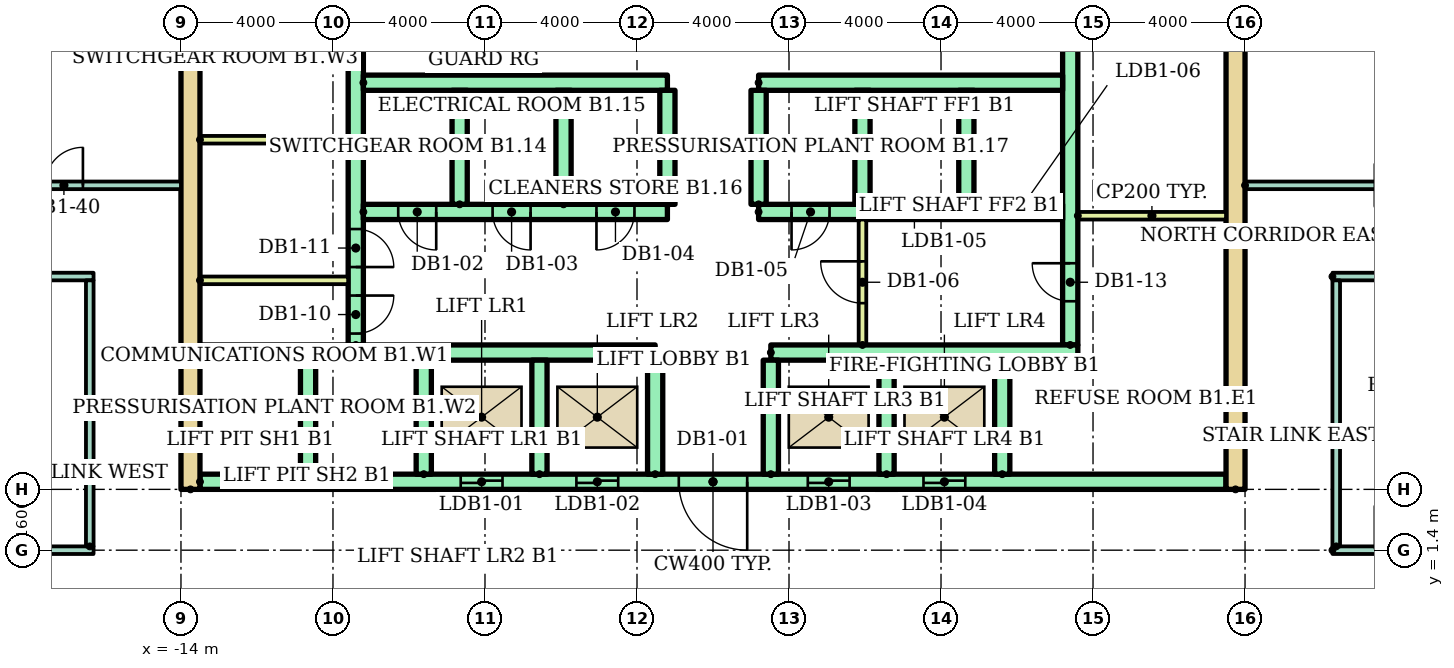
"""IFC4 building model, lengths in metres.
Left out: names, types, materials, properties, quantities, classifications, styles, units other than length and angle.
Written with IfcOpenShell. Run it as: python <this file> out.ifc"""

import sys

from ifc_helpers import new_model, si_unit, direction, frame, frame_2d, origin, place, context, subcontext, project, spatial, rectangle, extrude, element, fill, save


model = new_model("IFC4")
c1 = context("Model", 3, precision=1e-05, world=origin(), true_north=direction((0.0, 1.0)))
c2 = subcontext(c1, "Body", "Model", "MODEL_VIEW")
j1 = project(units=[si_unit("LENGTHUNIT", "METRE"), si_unit("PLANEANGLEUNIT", "RADIAN")], contexts=[c1])
p1 = place(None, origin())
s1 = spatial("IfcSite", under=j1, at=p1, CompositionType="ELEMENT")
p2 = place(p1, origin())
s2 = spatial("IfcBuilding", under=s1, at=p2, CompositionType="ELEMENT")
p3 = place(p2, frame((0.0, 0.0, -5.0)))
s3 = spatial("IfcBuildingStorey", under=s2, at=p3, CompositionType="ELEMENT", Elevation=-5.0)
for number, where, z_axis, x_axis in (
    (1, (-13.75, 3.0, 0.0), (0.0, 0.0, 1.0), (0.0, 1.0, 0.0)),
    (2, (13.75, 3.0, 0.0), (0.0, 0.0, 1.0), (0.0, 1.0, 0.0)),
):
    element("IfcWall", number, at=place(p3, frame(where, z_axis=z_axis, x_axis=x_axis)), inside=s3, PredefinedType="SHEAR", context=c2, shape_type="SweptSolid", body=[
        extrude(rectangle(XDim=17.4, YDim=0.5, at=frame_2d((8.7, 0.0))), origin(), (0.0, 0.0, 1.0), 4.58),
    ])
p4 = place(p3, frame((-9.4, 6.8, 0.0), z_axis=(0.0, 0.0, 1.0), x_axis=(0.0, 1.0, 0.0)))
e3 = element("IfcWall", 3, at=p4, inside=s3, PredefinedType="SHEAR", context=c2, shape_type="SweptSolid", body=[
    extrude(rectangle(XDim=12.7, YDim=0.4, at=frame_2d((6.35, 0.0))), origin(), (0.0, 0.0, 1.0), 4.58),
])
p5 = place(p4, frame((0.3, 0.0, 0.0)))
e4 = element("IfcOpeningElement", 4, at=p5, cuts=e3, PredefinedType="OPENING", context=c2, shape_type="SweptSolid", body=[
    extrude(rectangle(XDim=1.0, YDim=2.1, at=frame_2d((0.5, 1.05))), frame((0.0, 0.21, 0.0), z_axis=(0.0, -1.0, 0.0), x_axis=(1.0, 0.0, 0.0)), (0.0, 0.0, 1.0), 0.42),
])
p6 = place(p4, frame((2.05, 0.0, 0.0)))
e5 = element("IfcOpeningElement", 5, at=p6, cuts=e3, PredefinedType="OPENING", context=c2, shape_type="SweptSolid", body=[
    extrude(rectangle(XDim=1.0, YDim=2.1, at=frame_2d((0.5, 1.05))), frame((0.0, 0.21, 0.0), z_axis=(0.0, -1.0, 0.0), x_axis=(1.0, 0.0, 0.0)), (0.0, 0.0, 1.0), 0.42),
])
p7 = place(p4, frame((7.925, 0.0, 0.0)))
e6 = element("IfcOpeningElement", 6, at=p7, cuts=e3, PredefinedType="OPENING", context=c2, shape_type="SweptSolid", body=[
    extrude(rectangle(XDim=1.0, YDim=2.1, at=frame_2d((0.5, 1.05))), frame((0.0, 0.21, 0.0), z_axis=(0.0, -1.0, 0.0), x_axis=(1.0, 0.0, 0.0)), (0.0, 0.0, 1.0), 0.42),
])
p8 = place(p3, frame((9.4, 6.8, 0.0), z_axis=(0.0, 0.0, 1.0), x_axis=(0.0, 1.0, 0.0)))
e7 = element("IfcWall", 7, at=p8, inside=s3, PredefinedType="SHEAR", context=c2, shape_type="SweptSolid", body=[
    extrude(rectangle(XDim=12.7, YDim=0.4, at=frame_2d((6.35, 0.0))), origin(), (0.0, 0.0, 1.0), 4.58),
])
p9 = place(p8, frame((1.15, 0.0, 0.0)))
e8 = element("IfcOpeningElement", 8, at=p9, cuts=e7, PredefinedType="OPENING", context=c2, shape_type="SweptSolid", body=[
    extrude(rectangle(XDim=1.0, YDim=2.1, at=frame_2d((0.5, 1.05))), frame((0.0, 0.21, 0.0), z_axis=(0.0, -1.0, 0.0), x_axis=(1.0, 0.0, 0.0)), (0.0, 0.0, 1.0), 0.42),
])
p10 = place(p8, frame((7.925, 0.0, 0.0)))
e9 = element("IfcOpeningElement", 9, at=p10, cuts=e7, PredefinedType="OPENING", context=c2, shape_type="SweptSolid", body=[
    extrude(rectangle(XDim=1.0, YDim=2.1, at=frame_2d((0.5, 1.05))), frame((0.0, 0.21, 0.0), z_axis=(0.0, -1.0, 0.0), x_axis=(1.0, 0.0, 0.0)), (0.0, 0.0, 1.0), 0.42),
])
p11 = place(p3, frame((-13.5, 3.2, 0.0)))
e10 = element("IfcWall", 10, at=p11, inside=s3, PredefinedType="SHEAR", context=c2, shape_type="SweptSolid", body=[
    extrude(rectangle(XDim=27.0, YDim=0.4, at=frame_2d((13.5, 0.0))), origin(), (0.0, 0.0, 1.0), 4.58),
])
p12 = place(p11, frame((6.861, 0.0, 0.0)))
e11 = element("IfcOpeningElement", 11, at=p12, cuts=e10, PredefinedType="OPENING", context=c2, shape_type="SweptSolid", body=[
    extrude(rectangle(XDim=1.1, YDim=2.1, at=frame_2d((0.55, 1.05))), frame((0.0, 0.21, 0.0), z_axis=(0.0, -1.0, 0.0), x_axis=(1.0, 0.0, 0.0)), (0.0, 0.0, 1.0), 0.42),
])
p13 = place(p11, frame((9.906, 0.0, 0.0)))
e12 = element("IfcOpeningElement", 12, at=p13, cuts=e10, PredefinedType="OPENING", context=c2, shape_type="SweptSolid", body=[
    extrude(rectangle(XDim=1.1, YDim=2.1, at=frame_2d((0.55, 1.05))), frame((0.0, 0.21, 0.0), z_axis=(0.0, -1.0, 0.0), x_axis=(1.0, 0.0, 0.0)), (0.0, 0.0, 1.0), 0.42),
])
p14 = place(p11, frame((15.994, 0.0, 0.0)))
e13 = element("IfcOpeningElement", 13, at=p14, cuts=e10, PredefinedType="OPENING", context=c2, shape_type="SweptSolid", body=[
    extrude(rectangle(XDim=1.1, YDim=2.1, at=frame_2d((0.55, 1.05))), frame((0.0, 0.21, 0.0), z_axis=(0.0, -1.0, 0.0), x_axis=(1.0, 0.0, 0.0)), (0.0, 0.0, 1.0), 0.42),
])
p15 = place(p11, frame((19.039, 0.0, 0.0)))
e14 = element("IfcOpeningElement", 14, at=p15, cuts=e10, PredefinedType="OPENING", context=c2, shape_type="SweptSolid", body=[
    extrude(rectangle(XDim=1.1, YDim=2.1, at=frame_2d((0.55, 1.05))), frame((0.0, 0.21, 0.0), z_axis=(0.0, -1.0, 0.0), x_axis=(1.0, 0.0, 0.0)), (0.0, 0.0, 1.0), 0.42),
])
p16 = place(p11, frame((12.6, 0.0, 0.0)))
e15 = element("IfcOpeningElement", 15, at=p16, cuts=e10, PredefinedType="OPENING", context=c2, shape_type="SweptSolid", body=[
    extrude(rectangle(XDim=1.8, YDim=2.1, at=frame_2d((0.9, 1.05))), frame((0.0, 0.21, 0.0), z_axis=(0.0, -1.0, 0.0), x_axis=(1.0, 0.0, 0.0)), (0.0, 0.0, 1.0), 0.42),
])
p17 = place(p3, frame((-13.5, 6.6, 0.0)))
e16 = element("IfcWall", 16, at=p17, inside=s3, PredefinedType="SHEAR", context=c2, shape_type="SweptSolid", body=[
    extrude(rectangle(XDim=11.978, YDim=0.4, at=frame_2d((5.989, 0.0))), origin(), (0.0, 0.0, 1.0), 4.58),
])
p18 = place(p3, frame((1.522, 6.6, 0.0)))
e17 = element("IfcWall", 17, at=p18, inside=s3, PredefinedType="SHEAR", context=c2, shape_type="SweptSolid", body=[
    extrude(rectangle(XDim=8.078, YDim=0.4, at=frame_2d((4.039, 0.0))), origin(), (0.0, 0.0, 1.0), 4.58),
])
for number, where, z_axis, x_axis in (
    (18, (-10.656, 3.4, 0.0), (0.0, 0.0, 1.0), (0.0, 1.0, 0.0)),
    (19, (-7.611, 3.4, 0.0), (0.0, 0.0, 1.0), (0.0, 1.0, 0.0)),
    (20, (-4.567, 3.4, 0.0), (0.0, 0.0, 1.0), (0.0, 1.0, 0.0)),
    (21, (-1.522, 3.4, 0.0), (0.0, 0.0, 1.0), (0.0, 1.0, 0.0)),
    (22, (1.522, 3.4, 0.0), (0.0, 0.0, 1.0), (0.0, 1.0, 0.0)),
    (23, (4.567, 3.4, 0.0), (0.0, 0.0, 1.0), (0.0, 1.0, 0.0)),
    (24, (7.611, 3.4, 0.0), (0.0, 0.0, 1.0), (0.0, 1.0, 0.0)),
):
    element("IfcWall", number, at=place(p3, frame(where, z_axis=z_axis, x_axis=x_axis)), inside=s3, PredefinedType="SHEAR", context=c2, shape_type="SweptSolid", body=[
        extrude(rectangle(XDim=3.0, YDim=0.4, at=frame_2d((1.5, 0.0))), origin(), (0.0, 0.0, 1.0), 4.58),
    ])
p19 = place(p3, frame((-9.2, 10.3, 0.0)))
e25 = element("IfcWall", 25, at=p19, inside=s3, PredefinedType="SHEAR", context=c2, shape_type="SweptSolid", body=[
    extrude(rectangle(XDim=8.0, YDim=0.4, at=frame_2d((4.0, 0.0))), origin(), (0.0, 0.0, 1.0), 4.58),
])
p20 = place(p19, frame((0.917, 0.0, 0.0)))
e26 = element("IfcOpeningElement", 26, at=p20, cuts=e25, PredefinedType="OPENING", context=c2, shape_type="SweptSolid", body=[
    extrude(rectangle(XDim=1.0, YDim=2.1, at=frame_2d((0.5, 1.05))), frame((0.0, 0.21, 0.0), z_axis=(0.0, -1.0, 0.0), x_axis=(1.0, 0.0, 0.0)), (0.0, 0.0, 1.0), 0.42),
])
p21 = place(p19, frame((3.4, 0.0, 0.0)))
e27 = element("IfcOpeningElement", 27, at=p21, cuts=e25, PredefinedType="OPENING", context=c2, shape_type="SweptSolid", body=[
    extrude(rectangle(XDim=1.0, YDim=2.1, at=frame_2d((0.5, 1.05))), frame((0.0, 0.21, 0.0), z_axis=(0.0, -1.0, 0.0), x_axis=(1.0, 0.0, 0.0)), (0.0, 0.0, 1.0), 0.42),
])
p22 = place(p19, frame((6.133, 0.0, 0.0)))
e28 = element("IfcOpeningElement", 28, at=p22, cuts=e25, PredefinedType="OPENING", context=c2, shape_type="SweptSolid", body=[
    extrude(rectangle(XDim=1.0, YDim=2.1, at=frame_2d((0.5, 1.05))), frame((0.0, 0.21, 0.0), z_axis=(0.0, -1.0, 0.0), x_axis=(1.0, 0.0, 0.0)), (0.0, 0.0, 1.0), 0.42),
])
p23 = place(p3, frame((-9.2, 13.7, 0.0)))
e29 = element("IfcWall", 29, at=p23, inside=s3, PredefinedType="SHEAR", context=c2, shape_type="SweptSolid", body=[
    extrude(rectangle(XDim=8.0, YDim=0.4, at=frame_2d((4.0, 0.0))), origin(), (0.0, 0.0, 1.0), 4.58),
])
p24 = place(p3, frame((1.2, 10.3, 0.0)))
e30 = element("IfcWall", 30, at=p24, inside=s3, PredefinedType="SHEAR", context=c2, shape_type="SweptSolid", body=[
    extrude(rectangle(XDim=8.0, YDim=0.4, at=frame_2d((4.0, 0.0))), origin(), (0.0, 0.0, 1.0), 4.58),
])
p25 = place(p24, frame((3.55, 0.0, 0.0)))
e31 = element("IfcOpeningElement", 31, at=p25, cuts=e30, PredefinedType="OPENING", context=c2, shape_type="SweptSolid", body=[
    extrude(rectangle(XDim=1.1, YDim=2.1, at=frame_2d((0.55, 1.05))), frame((0.0, 0.21, 0.0), z_axis=(0.0, -1.0, 0.0), x_axis=(1.0, 0.0, 0.0)), (0.0, 0.0, 1.0), 0.42),
])
p26 = place(p24, frame((6.283, 0.0, 0.0)))
e32 = element("IfcOpeningElement", 32, at=p26, cuts=e30, PredefinedType="OPENING", context=c2, shape_type="SweptSolid", body=[
    extrude(rectangle(XDim=1.1, YDim=2.1, at=frame_2d((0.55, 1.05))), frame((0.0, 0.21, 0.0), z_axis=(0.0, -1.0, 0.0), x_axis=(1.0, 0.0, 0.0)), (0.0, 0.0, 1.0), 0.42),
])
p27 = place(p24, frame((0.867, 0.0, 0.0)))
e33 = element("IfcOpeningElement", 33, at=p27, cuts=e30, PredefinedType="OPENING", context=c2, shape_type="SweptSolid", body=[
    extrude(rectangle(XDim=1.0, YDim=2.1, at=frame_2d((0.5, 1.05))), frame((0.0, 0.21, 0.0), z_axis=(0.0, -1.0, 0.0), x_axis=(1.0, 0.0, 0.0)), (0.0, 0.0, 1.0), 0.42),
])
p28 = place(p3, frame((1.2, 13.7, 0.0)))
e34 = element("IfcWall", 34, at=p28, inside=s3, PredefinedType="SHEAR", context=c2, shape_type="SweptSolid", body=[
    extrude(rectangle(XDim=8.0, YDim=0.4, at=frame_2d((4.0, 0.0))), origin(), (0.0, 0.0, 1.0), 4.58),
])
for number, where, z_axis, x_axis in (
    (35, (-6.667, 10.5, 0.0), (0.0, 0.0, 1.0), (0.0, 1.0, 0.0)),
    (36, (-3.933, 10.5, 0.0), (0.0, 0.0, 1.0), (0.0, 1.0, 0.0)),
    (37, (-1.2, 10.5, 0.0), (0.0, 0.0, 1.0), (0.0, 1.0, 0.0)),
    (38, (1.2, 10.5, 0.0), (0.0, 0.0, 1.0), (0.0, 1.0, 0.0)),
    (39, (3.933, 10.5, 0.0), (0.0, 0.0, 1.0), (0.0, 1.0, 0.0)),
    (40, (6.667, 10.5, 0.0), (0.0, 0.0, 1.0), (0.0, 1.0, 0.0)),
):
    element("IfcWall", number, at=place(p3, frame(where, z_axis=z_axis, x_axis=x_axis)), inside=s3, PredefinedType="SHEAR", context=c2, shape_type="SweptSolid", body=[
        extrude(rectangle(XDim=3.0, YDim=0.4, at=frame_2d((1.5, 0.0))), origin(), (0.0, 0.0, 1.0), 4.58),
    ])
p29 = place(p3, frame((3.933, 6.8, 0.0), z_axis=(0.0, 0.0, 1.0), x_axis=(0.0, 1.0, 0.0)))
e41 = element("IfcWall", 41, at=p29, inside=s3, PredefinedType="PARTITIONING", context=c2, shape_type="SweptSolid", body=[
    extrude(rectangle(XDim=3.3, YDim=0.2, at=frame_2d((1.65, 0.0))), origin(), (0.0, 0.0, 1.0), 4.58),
])
p30 = place(p29, frame((1.1, 0.0, 0.0)))
e42 = element("IfcOpeningElement", 42, at=p30, cuts=e41, PredefinedType="OPENING", context=c2, shape_type="SweptSolid", body=[
    extrude(rectangle(XDim=1.1, YDim=2.1, at=frame_2d((0.55, 1.05))), frame((0.0, 0.11, 0.0), z_axis=(0.0, -1.0, 0.0), x_axis=(1.0, 0.0, 0.0)), (0.0, 0.0, 1.0), 0.22),
])
for number, where in (
    (43, (-13.5, 8.5, 0.0)),
    (44, (-13.5, 12.2, 0.0)),
    (45, (9.6, 10.2, 0.0)),
):
    element("IfcWall", number, at=place(p3, frame(where)), inside=s3, PredefinedType="PARTITIONING", context=c2, shape_type="SweptSolid", body=[
        extrude(rectangle(XDim=3.9, YDim=0.2, at=frame_2d((1.95, 0.0))), origin(), (0.0, 0.0, 1.0), 4.58),
    ])
p31 = place(p3, frame((-21.45, 1.4, 0.0)))
e46 = element("IfcWall", 46, at=p31, inside=s3, PredefinedType="PARTITIONING", context=c2, shape_type="SweptSolid", body=[
    extrude(rectangle(XDim=5.15, YDim=0.2, at=frame_2d((2.575, 0.0))), origin(), (0.0, 0.0, 1.0), 4.58),
])
p32 = place(p3, frame((16.3, 1.4, 0.0)))
e47 = element("IfcWall", 47, at=p32, inside=s3, PredefinedType="PARTITIONING", context=c2, shape_type="SweptSolid", body=[
    extrude(rectangle(XDim=1.15, YDim=0.2, at=frame_2d((0.575, 0.0))), origin(), (0.0, 0.0, 1.0), 4.58),
])
p33 = place(p3, frame((-37.6, 8.6, 0.0)))
e48 = element("IfcWall", 48, at=p33, inside=s3, PredefinedType="PARTITIONING", context=c2, shape_type="SweptSolid", body=[
    extrude(rectangle(XDim=21.3, YDim=0.2, at=frame_2d((10.65, 0.0))), origin(), (0.0, 0.0, 1.0), 4.58),
])
p34 = place(p33, frame((3.5, 0.0, 0.0)))
e49 = element("IfcOpeningElement", 49, at=p34, cuts=e48, PredefinedType="OPENING", context=c2, shape_type="SweptSolid", body=[
    extrude(rectangle(XDim=1.0, YDim=2.1, at=frame_2d((0.5, 1.05))), frame((0.0, 0.11, 0.0), z_axis=(0.0, -1.0, 0.0), x_axis=(1.0, 0.0, 0.0)), (0.0, 0.0, 1.0), 0.22),
])
p35 = place(p3, frame((16.3, 8.6, 0.0)))
e50 = element("IfcWall", 50, at=p35, inside=s3, PredefinedType="PARTITIONING", context=c2, shape_type="SweptSolid", body=[
    extrude(rectangle(XDim=21.3, YDim=0.2, at=frame_2d((10.65, 0.0))), origin(), (0.0, 0.0, 1.0), 4.58),
])
p36 = place(p35, frame((3.6, 0.0, 0.0)))
e51 = element("IfcOpeningElement", 51, at=p36, cuts=e50, PredefinedType="OPENING", context=c2, shape_type="SweptSolid", body=[
    extrude(rectangle(XDim=1.0, YDim=2.1, at=frame_2d((0.5, 1.05))), frame((0.0, 0.11, 0.0), z_axis=(0.0, -1.0, 0.0), x_axis=(1.0, 0.0, 0.0)), (0.0, 0.0, 1.0), 0.22),
])
p37 = place(p3, frame((-21.45, 11.0, 0.0)))
e52 = element("IfcWall", 52, at=p37, inside=s3, PredefinedType="PARTITIONING", context=c2, shape_type="SweptSolid", body=[
    extrude(rectangle(XDim=7.45, YDim=0.2, at=frame_2d((3.725, 0.0))), origin(), (0.0, 0.0, 1.0), 4.58),
])
p38 = place(p37, frame((0.35, 0.0, 0.0)))
e53 = element("IfcOpeningElement", 53, at=p38, cuts=e52, PredefinedType="OPENING", context=c2, shape_type="SweptSolid", body=[
    extrude(rectangle(XDim=1.0, YDim=2.1, at=frame_2d((0.5, 1.05))), frame((0.0, 0.11, 0.0), z_axis=(0.0, -1.0, 0.0), x_axis=(1.0, 0.0, 0.0)), (0.0, 0.0, 1.0), 0.22),
])
p39 = place(p37, frame((3.87, 0.0, 0.0)))
e54 = element("IfcOpeningElement", 54, at=p39, cuts=e52, PredefinedType="OPENING", context=c2, shape_type="SweptSolid", body=[
    extrude(rectangle(XDim=1.0, YDim=2.1, at=frame_2d((0.5, 1.05))), frame((0.0, 0.11, 0.0), z_axis=(0.0, -1.0, 0.0), x_axis=(1.0, 0.0, 0.0)), (0.0, 0.0, 1.0), 0.22),
])
p40 = place(p3, frame((14.0, 11.0, 0.0)))
e55 = element("IfcWall", 55, at=p40, inside=s3, PredefinedType="PARTITIONING", context=c2, shape_type="SweptSolid", body=[
    extrude(rectangle(XDim=3.45, YDim=0.2, at=frame_2d((1.725, 0.0))), origin(), (0.0, 0.0, 1.0), 4.58),
])
for number, where, z_axis, x_axis in (
    (56, (-16.4, 1.5, 0.0), (0.0, 0.0, 1.0), (0.0, 1.0, 0.0)),
    (57, (16.4, 1.5, 0.0), (0.0, 0.0, 1.0), (0.0, 1.0, 0.0)),
):
    element("IfcWall", number, at=place(p3, frame(where, z_axis=z_axis, x_axis=x_axis)), inside=s3, PredefinedType="PARTITIONING", context=c2, shape_type="SweptSolid", body=[
        extrude(rectangle(XDim=7.0, YDim=0.2, at=frame_2d((3.5, 0.0))), origin(), (0.0, 0.0, 1.0), 4.58),
    ])
p41 = place(p12, origin())
e58 = element("IfcDoor", 58, at=p41, inside=s3, OperationType="SLIDING_TO_LEFT", PredefinedType="DOOR", context=c2, shape_type="SweptSolid", body=[
    extrude(rectangle(XDim=1.1, YDim=2.1, at=frame_2d((0.55, 1.05))), frame((0.0, 0.025, 0.0), z_axis=(0.0, -1.0, 0.0), x_axis=(1.0, 0.0, 0.0)), (0.0, 0.0, 1.0), 0.05),
])
fill(e11, e58)
p42 = place(p13, origin())
e59 = element("IfcDoor", 59, at=p42, inside=s3, OperationType="SLIDING_TO_LEFT", PredefinedType="DOOR", context=c2, shape_type="SweptSolid", body=[
    extrude(rectangle(XDim=1.1, YDim=2.1, at=frame_2d((0.55, 1.05))), frame((0.0, 0.025, 0.0), z_axis=(0.0, -1.0, 0.0), x_axis=(1.0, 0.0, 0.0)), (0.0, 0.0, 1.0), 0.05),
])
fill(e12, e59)
p43 = place(p14, origin())
e60 = element("IfcDoor", 60, at=p43, inside=s3, OperationType="SLIDING_TO_LEFT", PredefinedType="DOOR", context=c2, shape_type="SweptSolid", body=[
    extrude(rectangle(XDim=1.1, YDim=2.1, at=frame_2d((0.55, 1.05))), frame((0.0, 0.025, 0.0), z_axis=(0.0, -1.0, 0.0), x_axis=(1.0, 0.0, 0.0)), (0.0, 0.0, 1.0), 0.05),
])
fill(e13, e60)
p44 = place(p15, origin())
e61 = element("IfcDoor", 61, at=p44, inside=s3, OperationType="SLIDING_TO_LEFT", PredefinedType="DOOR", context=c2, shape_type="SweptSolid", body=[
    extrude(rectangle(XDim=1.1, YDim=2.1, at=frame_2d((0.55, 1.05))), frame((0.0, 0.025, 0.0), z_axis=(0.0, -1.0, 0.0), x_axis=(1.0, 0.0, 0.0)), (0.0, 0.0, 1.0), 0.05),
])
fill(e14, e61)
p45 = place(p16, frame((1.8, 0.0, 0.0), z_axis=(0.0, 0.0, 1.0), x_axis=(-1.0, 0.0, 0.0)))
e62 = element("IfcDoor", 62, at=p45, inside=s3, OperationType="DOUBLE_DOOR_SINGLE_SWING", PredefinedType="DOOR", context=c2, shape_type="SweptSolid", body=[
    extrude(rectangle(XDim=1.8, YDim=2.1, at=frame_2d((0.9, 1.05))), frame((0.0, 0.025, 0.0), z_axis=(0.0, -1.0, 0.0), x_axis=(1.0, 0.0, 0.0)), (0.0, 0.0, 1.0), 0.05),
])
fill(e15, e62)
p46 = place(p25, origin())
e63 = element("IfcDoor", 63, at=p46, inside=s3, OperationType="SLIDING_TO_LEFT", PredefinedType="DOOR", context=c2, shape_type="SweptSolid", body=[
    extrude(rectangle(XDim=1.1, YDim=2.1, at=frame_2d((0.55, 1.05))), frame((0.0, 0.025, 0.0), z_axis=(0.0, -1.0, 0.0), x_axis=(1.0, 0.0, 0.0)), (0.0, 0.0, 1.0), 0.05),
])
fill(e31, e63)
p47 = place(p26, origin())
e64 = element("IfcDoor", 64, at=p47, inside=s3, OperationType="SLIDING_TO_LEFT", PredefinedType="DOOR", context=c2, shape_type="SweptSolid", body=[
    extrude(rectangle(XDim=1.1, YDim=2.1, at=frame_2d((0.55, 1.05))), frame((0.0, 0.025, 0.0), z_axis=(0.0, -1.0, 0.0), x_axis=(1.0, 0.0, 0.0)), (0.0, 0.0, 1.0), 0.05),
])
fill(e32, e64)
p48 = place(p20, frame((1.0, 0.0, 0.0), z_axis=(0.0, 0.0, 1.0), x_axis=(-1.0, 0.0, 0.0)))
e65 = element("IfcDoor", 65, at=p48, inside=s3, OperationType="SINGLE_SWING_RIGHT", PredefinedType="DOOR", context=c2, shape_type="SweptSolid", body=[
    extrude(rectangle(XDim=1.0, YDim=2.1, at=frame_2d((0.5, 1.05))), frame((0.0, 0.025, 0.0), z_axis=(0.0, -1.0, 0.0), x_axis=(1.0, 0.0, 0.0)), (0.0, 0.0, 1.0), 0.05),
])
fill(e26, e65)
p49 = place(p21, frame((1.0, 0.0, 0.0), z_axis=(0.0, 0.0, 1.0), x_axis=(-1.0, 0.0, 0.0)))
e66 = element("IfcDoor", 66, at=p49, inside=s3, OperationType="SINGLE_SWING_RIGHT", PredefinedType="DOOR", context=c2, shape_type="SweptSolid", body=[
    extrude(rectangle(XDim=1.0, YDim=2.1, at=frame_2d((0.5, 1.05))), frame((0.0, 0.025, 0.0), z_axis=(0.0, -1.0, 0.0), x_axis=(1.0, 0.0, 0.0)), (0.0, 0.0, 1.0), 0.05),
])
fill(e27, e66)
p50 = place(p22, frame((1.0, 0.0, 0.0), z_axis=(0.0, 0.0, 1.0), x_axis=(-1.0, 0.0, 0.0)))
e67 = element("IfcDoor", 67, at=p50, inside=s3, OperationType="SINGLE_SWING_LEFT", PredefinedType="DOOR", context=c2, shape_type="SweptSolid", body=[
    extrude(rectangle(XDim=1.0, YDim=2.1, at=frame_2d((0.5, 1.05))), frame((0.0, 0.025, 0.0), z_axis=(0.0, -1.0, 0.0), x_axis=(1.0, 0.0, 0.0)), (0.0, 0.0, 1.0), 0.05),
])
fill(e28, e67)
p51 = place(p27, frame((1.0, 0.0, 0.0), z_axis=(0.0, 0.0, 1.0), x_axis=(-1.0, 0.0, 0.0)))
e68 = element("IfcDoor", 68, at=p51, inside=s3, OperationType="SINGLE_SWING_LEFT", PredefinedType="DOOR", context=c2, shape_type="SweptSolid", body=[
    extrude(rectangle(XDim=1.0, YDim=2.1, at=frame_2d((0.5, 1.05))), frame((0.0, 0.025, 0.0), z_axis=(0.0, -1.0, 0.0), x_axis=(1.0, 0.0, 0.0)), (0.0, 0.0, 1.0), 0.05),
])
fill(e33, e68)
p52 = place(p30, origin())
e69 = element("IfcDoor", 69, at=p52, inside=s3, OperationType="SINGLE_SWING_RIGHT", PredefinedType="DOOR", context=c2, shape_type="SweptSolid", body=[
    extrude(rectangle(XDim=1.1, YDim=2.1, at=frame_2d((0.55, 1.05))), frame((0.0, 0.025, 0.0), z_axis=(0.0, -1.0, 0.0), x_axis=(1.0, 0.0, 0.0)), (0.0, 0.0, 1.0), 0.05),
])
fill(e42, e69)
p53 = place(p5, frame((1.0, 0.0, 0.0), z_axis=(0.0, 0.0, 1.0), x_axis=(-1.0, 0.0, 0.0)))
e70 = element("IfcDoor", 70, at=p53, inside=s3, OperationType="SINGLE_SWING_RIGHT", PredefinedType="DOOR", context=c2, shape_type="SweptSolid", body=[
    extrude(rectangle(XDim=1.0, YDim=2.1, at=frame_2d((0.5, 1.05))), frame((0.0, 0.025, 0.0), z_axis=(0.0, -1.0, 0.0), x_axis=(1.0, 0.0, 0.0)), (0.0, 0.0, 1.0), 0.05),
])
fill(e4, e70)
p54 = place(p6, frame((1.0, 0.0, 0.0), z_axis=(0.0, 0.0, 1.0), x_axis=(-1.0, 0.0, 0.0)))
e71 = element("IfcDoor", 71, at=p54, inside=s3, OperationType="SINGLE_SWING_LEFT", PredefinedType="DOOR", context=c2, shape_type="SweptSolid", body=[
    extrude(rectangle(XDim=1.0, YDim=2.1, at=frame_2d((0.5, 1.05))), frame((0.0, 0.025, 0.0), z_axis=(0.0, -1.0, 0.0), x_axis=(1.0, 0.0, 0.0)), (0.0, 0.0, 1.0), 0.05),
])
fill(e5, e71)
p55 = place(p9, origin())
e72 = element("IfcDoor", 72, at=p55, inside=s3, OperationType="SINGLE_SWING_RIGHT", PredefinedType="DOOR", context=c2, shape_type="SweptSolid", body=[
    extrude(rectangle(XDim=1.0, YDim=2.1, at=frame_2d((0.5, 1.05))), frame((0.0, 0.025, 0.0), z_axis=(0.0, -1.0, 0.0), x_axis=(1.0, 0.0, 0.0)), (0.0, 0.0, 1.0), 0.05),
])
fill(e8, e72)
p56 = place(p39, origin())
e73 = element("IfcDoor", 73, at=p56, inside=s3, OperationType="SINGLE_SWING_RIGHT", PredefinedType="DOOR", context=c2, shape_type="SweptSolid", body=[
    extrude(rectangle(XDim=1.0, YDim=2.1, at=frame_2d((0.5, 1.05))), frame((0.0, 0.025, 0.0), z_axis=(0.0, -1.0, 0.0), x_axis=(1.0, 0.0, 0.0)), (0.0, 0.0, 1.0), 0.05),
])
fill(e54, e73)
save(model, sys.argv[1])
